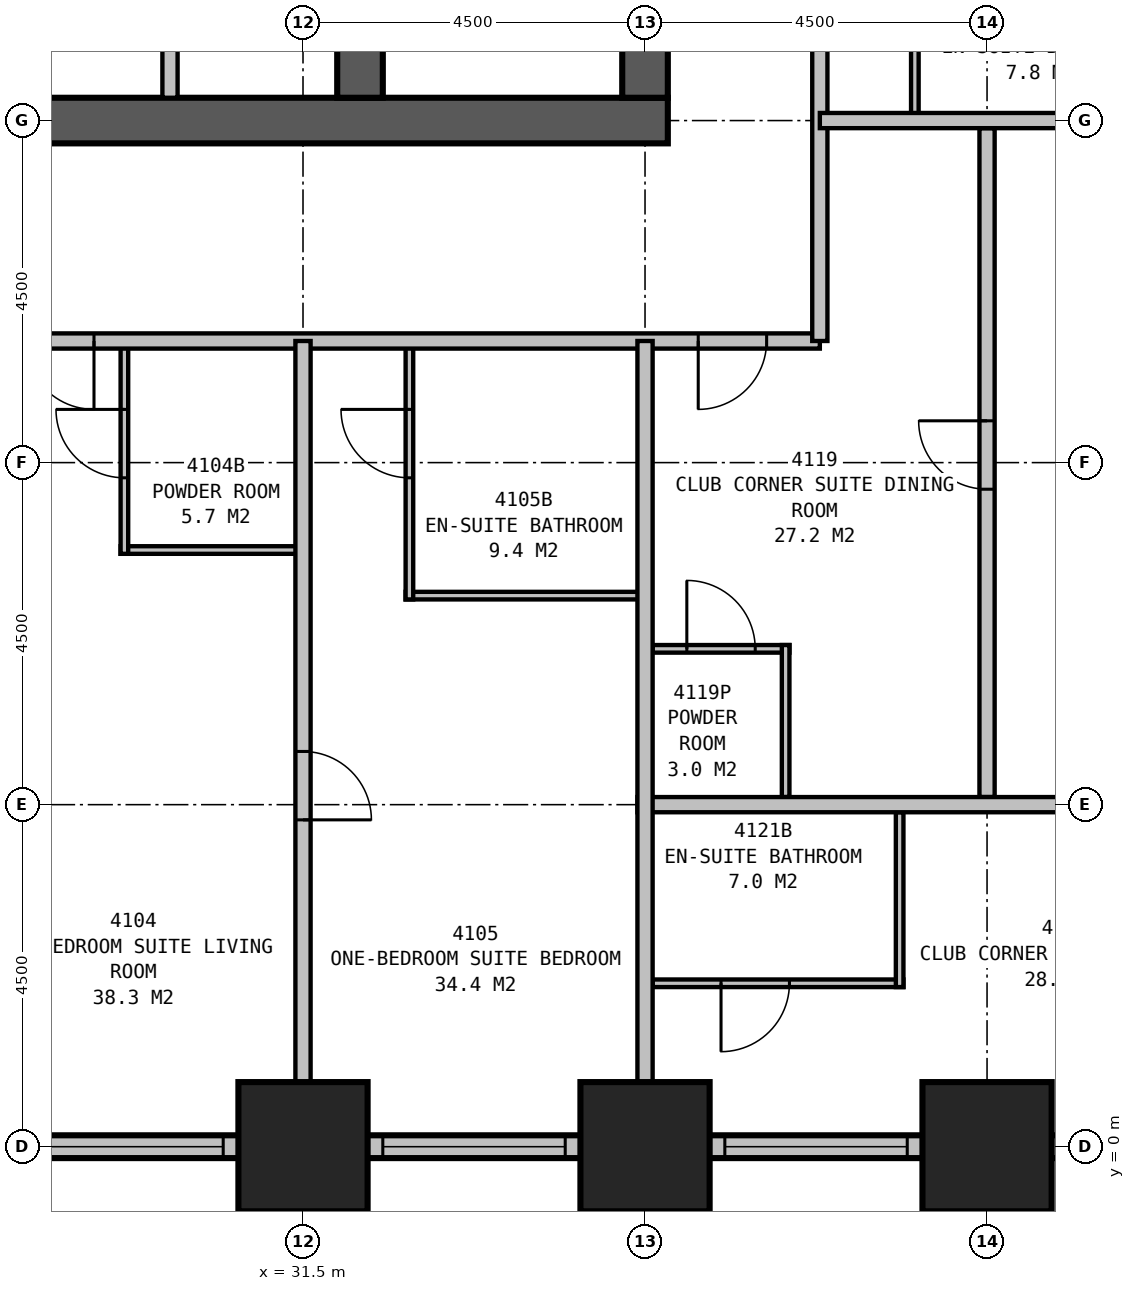
"""IFC4 building model, lengths in metres.
Left out: names, types, materials, properties, quantities, classifications, styles, units other than length and angle.
Written with IfcOpenShell. Run it as: python <this file> out.ifc"""

import sys

from ifc_helpers import new_model, si_unit, direction, frame, frame_2d, origin, origin_2d, place, context, subcontext, project, spatial, rectangle, extrude, element, fill, save


model = new_model("IFC4")
c1 = context("Model", 3, precision=1e-05, world=origin(), true_north=direction((0.0, 1.0)))
c2 = subcontext(c1, "Body", "Model", "MODEL_VIEW")
j1 = project(units=[si_unit("LENGTHUNIT", "METRE"), si_unit("PLANEANGLEUNIT", "RADIAN")], contexts=[c1])
p1 = place(None, origin())
s1 = spatial("IfcSite", under=j1, at=p1, CompositionType="ELEMENT")
p2 = place(p1, origin())
s2 = spatial("IfcBuilding", under=s1, at=p2, CompositionType="ELEMENT")
p3 = place(p2, frame((0.0, 0.0, 162.4)))
s3 = spatial("IfcBuildingStorey", under=s2, at=p3, CompositionType="ELEMENT", Elevation=162.4)
for number, where, z_axis, x_axis in (
    (1, (31.5, 0.0, 0.0), (0.0, 0.0, 1.0), (1.0, 0.0, 0.0)),
    (2, (36.0, 0.0, 0.0), (0.0, 0.0, 1.0), (1.0, 0.0, 0.0)),
    (3, (40.5, 0.0, 0.0), (0.0, 0.0, 1.0), (1.0, 0.0, 0.0)),
):
    element("IfcColumn", number, at=place(p3, frame(where, z_axis=z_axis, x_axis=x_axis)), inside=s3, PredefinedType="COLUMN", context=c2, shape_type="SweptSolid", body=[
        extrude(rectangle(XDim=1.7, YDim=1.7, at=origin_2d()), origin(), (0.0, 0.0, 1.0), 3.5),
    ])
p4 = place(p3, frame((13.2, 13.5, 0.0), z_axis=(0.0, 0.0, 1.0), x_axis=(1.0, 0.0, 0.0)))
e4 = element("IfcWall", 4, at=p4, inside=s3, PredefinedType="SHEAR", context=c2, shape_type="SweptSolid", body=[
    extrude(rectangle(XDim=23.1, YDim=0.6, at=frame_2d((11.55, 0.0))), origin(), (0.0, 0.0, 1.0), 3.5),
])
p5 = place(p3, frame((32.25, 13.8, 0.0), z_axis=(0.0, 0.0, 1.0), x_axis=(0.0, 1.0, 0.0)))
e5 = element("IfcWall", 5, at=p5, inside=s3, PredefinedType="SHEAR", context=c2, shape_type="SweptSolid", body=[
    extrude(rectangle(XDim=12.9, YDim=0.6, at=frame_2d((6.45, 0.0))), origin(), (0.0, 0.0, 1.0), 3.5),
])
p6 = place(p5, frame((5.05, 0.0, 0.0), z_axis=(0.0, 0.0, 1.0), x_axis=(-1.0, 0.0, 0.0)))
e6 = element("IfcOpeningElement", 6, at=p6, cuts=e5, PredefinedType="OPENING", context=c2, shape_type="SweptSolid", body=[
    extrude(rectangle(XDim=1.2, YDim=2.1, at=frame_2d((0.6, 1.05))), frame((0.0, 0.31, 0.0), z_axis=(0.0, -1.0, 0.0), x_axis=(1.0, 0.0, 0.0)), (0.0, 0.0, 1.0), 0.62),
])
p7 = place(p3, frame((36.0, 13.8, 0.0), z_axis=(0.0, 0.0, 1.0), x_axis=(0.0, 1.0, 0.0)))
e7 = element("IfcWall", 7, at=p7, inside=s3, PredefinedType="SHEAR", context=c2, shape_type="SweptSolid", body=[
    extrude(rectangle(XDim=2.7, YDim=0.6, at=frame_2d((1.35, 0.0))), origin(), (0.0, 0.0, 1.0), 3.5),
])
p8 = place(p3, frame((8.85, 0.0, 0.0), z_axis=(0.0, 0.0, 1.0), x_axis=(1.0, 0.0, 0.0)))
e8 = element("IfcWall", 8, at=p8, inside=s3, PredefinedType="STANDARD", context=c2, shape_type="SweptSolid", body=[
    extrude(rectangle(XDim=36.3, YDim=0.3, at=frame_2d((18.15, 0.0))), origin(), (0.0, 0.0, 1.0), 2.25),
])
p9 = place(p8, frame((1.65, 0.0, 0.5)))
e9 = element("IfcOpeningElement", 9, at=p9, cuts=e8, PredefinedType="OPENING", context=c2, shape_type="SweptSolid", body=[
    extrude(rectangle(XDim=1.5, YDim=1.6, at=frame_2d((0.75, 0.8))), frame((0.0, 0.16, 0.0), z_axis=(0.0, -1.0, 0.0), x_axis=(1.0, 0.0, 0.0)), (0.0, 0.0, 1.0), 0.32),
])
p10 = place(p8, frame((5.7, 0.0, 0.5)))
e10 = element("IfcOpeningElement", 10, at=p10, cuts=e8, PredefinedType="OPENING", context=c2, shape_type="SweptSolid", body=[
    extrude(rectangle(XDim=2.4, YDim=1.6, at=frame_2d((1.2, 0.8))), frame((0.0, 0.16, 0.0), z_axis=(0.0, -1.0, 0.0), x_axis=(1.0, 0.0, 0.0)), (0.0, 0.0, 1.0), 0.32),
])
p11 = place(p8, frame((10.2, 0.0, 0.5)))
e11 = element("IfcOpeningElement", 11, at=p11, cuts=e8, PredefinedType="OPENING", context=c2, shape_type="SweptSolid", body=[
    extrude(rectangle(XDim=2.4, YDim=1.6, at=frame_2d((1.2, 0.8))), frame((0.0, 0.16, 0.0), z_axis=(0.0, -1.0, 0.0), x_axis=(1.0, 0.0, 0.0)), (0.0, 0.0, 1.0), 0.32),
])
p12 = place(p8, frame((14.7, 0.0, 0.5)))
e12 = element("IfcOpeningElement", 12, at=p12, cuts=e8, PredefinedType="OPENING", context=c2, shape_type="SweptSolid", body=[
    extrude(rectangle(XDim=2.4, YDim=1.6, at=frame_2d((1.2, 0.8))), frame((0.0, 0.16, 0.0), z_axis=(0.0, -1.0, 0.0), x_axis=(1.0, 0.0, 0.0)), (0.0, 0.0, 1.0), 0.32),
])
p13 = place(p8, frame((19.2, 0.0, 0.5)))
e13 = element("IfcOpeningElement", 13, at=p13, cuts=e8, PredefinedType="OPENING", context=c2, shape_type="SweptSolid", body=[
    extrude(rectangle(XDim=2.4, YDim=1.6, at=frame_2d((1.2, 0.8))), frame((0.0, 0.16, 0.0), z_axis=(0.0, -1.0, 0.0), x_axis=(1.0, 0.0, 0.0)), (0.0, 0.0, 1.0), 0.32),
])
p14 = place(p8, frame((23.7, 0.0, 0.5)))
e14 = element("IfcOpeningElement", 14, at=p14, cuts=e8, PredefinedType="OPENING", context=c2, shape_type="SweptSolid", body=[
    extrude(rectangle(XDim=2.4, YDim=1.6, at=frame_2d((1.2, 0.8))), frame((0.0, 0.16, 0.0), z_axis=(0.0, -1.0, 0.0), x_axis=(1.0, 0.0, 0.0)), (0.0, 0.0, 1.0), 0.32),
])
p15 = place(p8, frame((28.2, 0.0, 0.5)))
e15 = element("IfcOpeningElement", 15, at=p15, cuts=e8, PredefinedType="OPENING", context=c2, shape_type="SweptSolid", body=[
    extrude(rectangle(XDim=2.4, YDim=1.6, at=frame_2d((1.2, 0.8))), frame((0.0, 0.16, 0.0), z_axis=(0.0, -1.0, 0.0), x_axis=(1.0, 0.0, 0.0)), (0.0, 0.0, 1.0), 0.32),
])
p16 = place(p8, frame((32.7, 0.0, 0.5)))
e16 = element("IfcOpeningElement", 16, at=p16, cuts=e8, PredefinedType="OPENING", context=c2, shape_type="SweptSolid", body=[
    extrude(rectangle(XDim=2.4, YDim=1.6, at=frame_2d((1.2, 0.8))), frame((0.0, 0.16, 0.0), z_axis=(0.0, -1.0, 0.0), x_axis=(1.0, 0.0, 0.0)), (0.0, 0.0, 1.0), 0.32),
])
p17 = place(p3, frame((11.2, 10.6, 0.0), z_axis=(0.0, 0.0, 1.0), x_axis=(1.0, 0.0, 0.0)))
e17 = element("IfcWall", 17, at=p17, inside=s3, PredefinedType="PARTITIONING", context=c2, shape_type="SweptSolid", body=[
    extrude(rectangle(XDim=27.1, YDim=0.2, at=frame_2d((13.55, 0.0))), origin(), (0.0, 0.0, 1.0), 3.25),
])
p18 = place(p17, frame((4.05, 0.0, 0.0), z_axis=(0.0, 0.0, 1.0), x_axis=(-1.0, 0.0, 0.0)))
e18 = element("IfcOpeningElement", 18, at=p18, cuts=e17, PredefinedType="OPENING", context=c2, shape_type="SweptSolid", body=[
    extrude(rectangle(XDim=0.9, YDim=2.1, at=frame_2d((0.45, 1.05))), frame((0.0, 0.11, 0.0), z_axis=(0.0, -1.0, 0.0), x_axis=(1.0, 0.0, 0.0)), (0.0, 0.0, 1.0), 0.22),
])
p19 = place(p17, frame((12.65, 0.0, 0.0), z_axis=(0.0, 0.0, 1.0), x_axis=(-1.0, 0.0, 0.0)))
e19 = element("IfcOpeningElement", 19, at=p19, cuts=e17, PredefinedType="OPENING", context=c2, shape_type="SweptSolid", body=[
    extrude(rectangle(XDim=1.0, YDim=2.1, at=frame_2d((0.5, 1.05))), frame((0.0, 0.11, 0.0), z_axis=(0.0, -1.0, 0.0), x_axis=(1.0, 0.0, 0.0)), (0.0, 0.0, 1.0), 0.22),
])
p20 = place(p17, frame((17.55, 0.0, 0.0), z_axis=(0.0, 0.0, 1.0), x_axis=(-1.0, 0.0, 0.0)))
e20 = element("IfcOpeningElement", 20, at=p20, cuts=e17, PredefinedType="OPENING", context=c2, shape_type="SweptSolid", body=[
    extrude(rectangle(XDim=0.9, YDim=2.1, at=frame_2d((0.45, 1.05))), frame((0.0, 0.11, 0.0), z_axis=(0.0, -1.0, 0.0), x_axis=(1.0, 0.0, 0.0)), (0.0, 0.0, 1.0), 0.22),
])
p21 = place(p17, frame((1.6, 0.0, 0.0), z_axis=(0.0, 0.0, 1.0), x_axis=(-1.0, 0.0, 0.0)))
e21 = element("IfcOpeningElement", 21, at=p21, cuts=e17, PredefinedType="OPENING", context=c2, shape_type="SweptSolid", body=[
    extrude(rectangle(XDim=0.9, YDim=2.1, at=frame_2d((0.45, 1.05))), frame((0.0, 0.11, 0.0), z_axis=(0.0, -1.0, 0.0), x_axis=(1.0, 0.0, 0.0)), (0.0, 0.0, 1.0), 0.22),
])
p22 = place(p17, frame((26.4, 0.0, 0.0), z_axis=(0.0, 0.0, 1.0), x_axis=(-1.0, 0.0, 0.0)))
e22 = element("IfcOpeningElement", 22, at=p22, cuts=e17, PredefinedType="OPENING", context=c2, shape_type="SweptSolid", body=[
    extrude(rectangle(XDim=0.9, YDim=2.1, at=frame_2d((0.45, 1.05))), frame((0.0, 0.11, 0.0), z_axis=(0.0, -1.0, 0.0), x_axis=(1.0, 0.0, 0.0)), (0.0, 0.0, 1.0), 0.22),
])
p23 = place(p3, frame((38.3, 10.6, 0.0), z_axis=(0.0, 0.0, 1.0), x_axis=(0.0, 1.0, 0.0)))
e23 = element("IfcWall", 23, at=p23, inside=s3, PredefinedType="PARTITIONING", context=c2, shape_type="SweptSolid", body=[
    extrude(rectangle(XDim=18.7, YDim=0.2, at=frame_2d((9.35, 0.0))), origin(), (0.0, 0.0, 1.0), 3.25),
])
p24 = place(p23, frame((6.95, 0.0, 0.0), z_axis=(0.0, 0.0, 1.0), x_axis=(-1.0, 0.0, 0.0)))
e24 = element("IfcOpeningElement", 24, at=p24, cuts=e23, PredefinedType="OPENING", context=c2, shape_type="SweptSolid", body=[
    extrude(rectangle(XDim=0.9, YDim=2.1, at=frame_2d((0.45, 1.05))), frame((0.0, 0.11, 0.0), z_axis=(0.0, -1.0, 0.0), x_axis=(1.0, 0.0, 0.0)), (0.0, 0.0, 1.0), 0.22),
])
p25 = place(p23, frame((11.05, 0.0, 0.0), z_axis=(0.0, 0.0, 1.0), x_axis=(-1.0, 0.0, 0.0)))
e25 = element("IfcOpeningElement", 25, at=p25, cuts=e23, PredefinedType="OPENING", context=c2, shape_type="SweptSolid", body=[
    extrude(rectangle(XDim=0.9, YDim=2.1, at=frame_2d((0.45, 1.05))), frame((0.0, 0.11, 0.0), z_axis=(0.0, -1.0, 0.0), x_axis=(1.0, 0.0, 0.0)), (0.0, 0.0, 1.0), 0.22),
])
p26 = place(p3, frame((31.5, 10.6, 0.0), z_axis=(0.0, 0.0, 1.0), x_axis=(0.0, -1.0, 0.0)))
e26 = element("IfcWall", 26, at=p26, inside=s3, PredefinedType="PARTITIONING", context=c2, shape_type="SweptSolid", body=[
    extrude(rectangle(XDim=10.6, YDim=0.2, at=frame_2d((5.3, 0.0))), origin(), (0.0, 0.0, 1.0), 2.25),
])
p27 = place(p26, frame((5.4, 0.0, 0.0)))
e27 = element("IfcOpeningElement", 27, at=p27, cuts=e26, PredefinedType="OPENING", context=c2, shape_type="SweptSolid", body=[
    extrude(rectangle(XDim=0.9, YDim=2.1, at=frame_2d((0.45, 1.05))), frame((0.0, 0.11, 0.0), z_axis=(0.0, -1.0, 0.0), x_axis=(1.0, 0.0, 0.0)), (0.0, 0.0, 1.0), 0.22),
])
p28 = place(p3, frame((29.1, 7.85, 0.0), z_axis=(0.0, 0.0, 1.0), x_axis=(1.0, 0.0, 0.0)))
e28 = element("IfcWall", 28, at=p28, inside=s3, PredefinedType="PLUMBINGWALL", context=c2, shape_type="SweptSolid", body=[
    extrude(rectangle(XDim=2.4, YDim=0.1, at=frame_2d((1.2, 0.0))), origin(), (0.0, 0.0, 1.0), 3.25),
])
p29 = place(p3, frame((29.15, 10.6, 0.0), z_axis=(0.0, 0.0, 1.0), x_axis=(0.0, -1.0, 0.0)))
e29 = element("IfcWall", 29, at=p29, inside=s3, PredefinedType="PLUMBINGWALL", context=c2, shape_type="SweptSolid", body=[
    extrude(rectangle(XDim=2.8, YDim=0.1, at=frame_2d((1.4, 0.0))), origin(), (0.0, 0.0, 1.0), 3.25),
])
p30 = place(p29, frame((1.8, 0.0, 0.0), z_axis=(0.0, 0.0, 1.0), x_axis=(-1.0, 0.0, 0.0)))
e30 = element("IfcOpeningElement", 30, at=p30, cuts=e29, PredefinedType="OPENING", context=c2, shape_type="SweptSolid", body=[
    extrude(rectangle(XDim=0.9, YDim=2.1, at=frame_2d((0.45, 1.05))), frame((0.0, 0.06, 0.0), z_axis=(0.0, -1.0, 0.0), x_axis=(1.0, 0.0, 0.0)), (0.0, 0.0, 1.0), 0.12),
])
p31 = place(p3, frame((32.85, 7.25, 0.0), z_axis=(0.0, 0.0, 1.0), x_axis=(1.0, 0.0, 0.0)))
e31 = element("IfcWall", 31, at=p31, inside=s3, PredefinedType="PLUMBINGWALL", context=c2, shape_type="SweptSolid", body=[
    extrude(rectangle(XDim=3.15, YDim=0.1, at=frame_2d((1.575, 0.0))), origin(), (0.0, 0.0, 1.0), 3.25),
])
p32 = place(p3, frame((32.9, 10.6, 0.0), z_axis=(0.0, 0.0, 1.0), x_axis=(0.0, -1.0, 0.0)))
e32 = element("IfcWall", 32, at=p32, inside=s3, PredefinedType="PLUMBINGWALL", context=c2, shape_type="SweptSolid", body=[
    extrude(rectangle(XDim=3.4, YDim=0.1, at=frame_2d((1.7, 0.0))), origin(), (0.0, 0.0, 1.0), 3.25),
])
p33 = place(p32, frame((1.8, 0.0, 0.0), z_axis=(0.0, 0.0, 1.0), x_axis=(-1.0, 0.0, 0.0)))
e33 = element("IfcOpeningElement", 33, at=p33, cuts=e32, PredefinedType="OPENING", context=c2, shape_type="SweptSolid", body=[
    extrude(rectangle(XDim=0.9, YDim=2.1, at=frame_2d((0.45, 1.05))), frame((0.0, 0.06, 0.0), z_axis=(0.0, -1.0, 0.0), x_axis=(1.0, 0.0, 0.0)), (0.0, 0.0, 1.0), 0.12),
])
p34 = place(p3, frame((39.55, 13.5, 0.0), z_axis=(0.0, 0.0, 1.0), x_axis=(0.0, 1.0, 0.0)))
e34 = element("IfcWall", 34, at=p34, inside=s3, PredefinedType="PLUMBINGWALL", context=c2, shape_type="SweptSolid", body=[
    extrude(rectangle(XDim=2.8, YDim=0.1, at=frame_2d((1.4, 0.0))), origin(), (0.0, 0.0, 1.0), 3.25),
])
p35 = place(p3, frame((38.3, 13.5, 0.0), z_axis=(0.0, 0.0, 1.0), x_axis=(1.0, 0.0, 0.0)))
e35 = element("IfcWall", 35, at=p35, inside=s3, PredefinedType="PARTITIONING", context=c2, shape_type="SweptSolid", body=[
    extrude(rectangle(XDim=9.921, YDim=0.2, at=frame_2d((4.96, 0.0))), origin(), (0.0, 0.0, 1.0), 1.95),
])
p36 = place(p3, frame((36.0, 10.6, 0.0), z_axis=(0.0, 0.0, 1.0), x_axis=(0.0, -1.0, 0.0)))
e36 = element("IfcWall", 36, at=p36, inside=s3, PredefinedType="PARTITIONING", context=c2, shape_type="SweptSolid", body=[
    extrude(rectangle(XDim=10.6, YDim=0.2, at=frame_2d((5.3, 0.0))), origin(), (0.0, 0.0, 1.0), 2.25),
])
p37 = place(p3, frame((35.9, 4.5, 0.0), z_axis=(0.0, 0.0, 1.0), x_axis=(1.0, 0.0, 0.0)))
e37 = element("IfcWall", 37, at=p37, inside=s3, PredefinedType="PARTITIONING", context=c2, shape_type="SweptSolid", body=[
    extrude(rectangle(XDim=9.1, YDim=0.2, at=frame_2d((4.55, 0.0))), origin(), (0.0, 0.0, 1.0), 3.25),
])
p38 = place(p37, frame((7.1, 0.0, 0.0)))
e38 = element("IfcOpeningElement", 38, at=p38, cuts=e37, PredefinedType="OPENING", context=c2, shape_type="SweptSolid", body=[
    extrude(rectangle(XDim=0.9, YDim=2.1, at=frame_2d((0.45, 1.05))), frame((0.0, 0.11, 0.0), z_axis=(0.0, -1.0, 0.0), x_axis=(1.0, 0.0, 0.0)), (0.0, 0.0, 1.0), 0.22),
])
p39 = place(p3, frame((40.5, 4.6, 0.0), z_axis=(0.0, 0.0, 1.0), x_axis=(0.0, 1.0, 0.0)))
e39 = element("IfcWall", 39, at=p39, inside=s3, PredefinedType="PARTITIONING", context=c2, shape_type="SweptSolid", body=[
    extrude(rectangle(XDim=8.8, YDim=0.2, at=frame_2d((4.4, 0.0))), origin(), (0.0, 0.0, 1.0), 2.25),
])
p40 = place(p39, frame((4.05, 0.0, 0.0)))
e40 = element("IfcOpeningElement", 40, at=p40, cuts=e39, PredefinedType="OPENING", context=c2, shape_type="SweptSolid", body=[
    extrude(rectangle(XDim=0.9, YDim=2.1, at=frame_2d((0.45, 1.05))), frame((0.0, 0.11, 0.0), z_axis=(0.0, -1.0, 0.0), x_axis=(1.0, 0.0, 0.0)), (0.0, 0.0, 1.0), 0.22),
])
p41 = place(p3, frame((37.85, 4.6, 0.0), z_axis=(0.0, 0.0, 1.0), x_axis=(0.0, 1.0, 0.0)))
e41 = element("IfcWall", 41, at=p41, inside=s3, PredefinedType="PLUMBINGWALL", context=c2, shape_type="SweptSolid", body=[
    extrude(rectangle(XDim=2.0, YDim=0.1, at=frame_2d((1.0, 0.0))), origin(), (0.0, 0.0, 1.0), 3.25),
])
p42 = place(p3, frame((36.1, 6.55, 0.0), z_axis=(0.0, 0.0, 1.0), x_axis=(1.0, 0.0, 0.0)))
e42 = element("IfcWall", 42, at=p42, inside=s3, PredefinedType="PLUMBINGWALL", context=c2, shape_type="SweptSolid", body=[
    extrude(rectangle(XDim=1.8, YDim=0.1, at=frame_2d((0.9, 0.0))), origin(), (0.0, 0.0, 1.0), 3.25),
])
p43 = place(p42, frame((0.45, 0.0, 0.0)))
e43 = element("IfcOpeningElement", 43, at=p43, cuts=e42, PredefinedType="OPENING", context=c2, shape_type="SweptSolid", body=[
    extrude(rectangle(XDim=0.9, YDim=2.1, at=frame_2d((0.45, 1.05))), frame((0.0, 0.06, 0.0), z_axis=(0.0, -1.0, 0.0), x_axis=(1.0, 0.0, 0.0)), (0.0, 0.0, 1.0), 0.12),
])
p44 = place(p3, frame((39.35, 4.4, 0.0), z_axis=(0.0, 0.0, 1.0), x_axis=(0.0, -1.0, 0.0)))
e44 = element("IfcWall", 44, at=p44, inside=s3, PredefinedType="PLUMBINGWALL", context=c2, shape_type="SweptSolid", body=[
    extrude(rectangle(XDim=2.3, YDim=0.1, at=frame_2d((1.15, 0.0))), origin(), (0.0, 0.0, 1.0), 3.25),
])
p45 = place(p3, frame((36.1, 2.15, 0.0), z_axis=(0.0, 0.0, 1.0), x_axis=(1.0, 0.0, 0.0)))
e45 = element("IfcWall", 45, at=p45, inside=s3, PredefinedType="PLUMBINGWALL", context=c2, shape_type="SweptSolid", body=[
    extrude(rectangle(XDim=3.3, YDim=0.1, at=frame_2d((1.65, 0.0))), origin(), (0.0, 0.0, 1.0), 3.25),
])
p46 = place(p45, frame((1.8, 0.0, 0.0), z_axis=(0.0, 0.0, 1.0), x_axis=(-1.0, 0.0, 0.0)))
e46 = element("IfcOpeningElement", 46, at=p46, cuts=e45, PredefinedType="OPENING", context=c2, shape_type="SweptSolid", body=[
    extrude(rectangle(XDim=0.9, YDim=2.1, at=frame_2d((0.45, 1.05))), frame((0.0, 0.06, 0.0), z_axis=(0.0, -1.0, 0.0), x_axis=(1.0, 0.0, 0.0)), (0.0, 0.0, 1.0), 0.12),
])
p47 = place(p3, frame((29.75, 13.8, 0.0), z_axis=(0.0, 0.0, 1.0), x_axis=(0.0, 1.0, 0.0)))
e47 = element("IfcWall", 47, at=p47, inside=s3, PredefinedType="PARTITIONING", context=c2, shape_type="SweptSolid", body=[
    extrude(rectangle(XDim=2.4, YDim=0.2, at=frame_2d((1.2, 0.0))), origin(), (0.0, 0.0, 1.0), 3.25),
])
p48 = place(p13, origin())
e48 = element("IfcWindow", 48, at=p48, inside=s3, PartitioningType="SINGLE_PANEL", PredefinedType="WINDOW", context=c2, shape_type="SweptSolid", body=[
    extrude(rectangle(XDim=2.4, YDim=1.6, at=frame_2d((1.2, 0.8))), frame((0.0, 0.03, 0.0), z_axis=(0.0, -1.0, 0.0), x_axis=(1.0, 0.0, 0.0)), (0.0, 0.0, 1.0), 0.06),
])
fill(e13, e48)
p49 = place(p14, origin())
e49 = element("IfcWindow", 49, at=p49, inside=s3, PartitioningType="SINGLE_PANEL", PredefinedType="WINDOW", context=c2, shape_type="SweptSolid", body=[
    extrude(rectangle(XDim=2.4, YDim=1.6, at=frame_2d((1.2, 0.8))), frame((0.0, 0.03, 0.0), z_axis=(0.0, -1.0, 0.0), x_axis=(1.0, 0.0, 0.0)), (0.0, 0.0, 1.0), 0.06),
])
fill(e14, e49)
p50 = place(p15, origin())
e50 = element("IfcWindow", 50, at=p50, inside=s3, PartitioningType="SINGLE_PANEL", PredefinedType="WINDOW", context=c2, shape_type="SweptSolid", body=[
    extrude(rectangle(XDim=2.4, YDim=1.6, at=frame_2d((1.2, 0.8))), frame((0.0, 0.03, 0.0), z_axis=(0.0, -1.0, 0.0), x_axis=(1.0, 0.0, 0.0)), (0.0, 0.0, 1.0), 0.06),
])
fill(e15, e50)
p51 = place(p20, origin())
e51 = element("IfcDoor", 51, at=p51, inside=s3, OperationType="SINGLE_SWING_LEFT", PredefinedType="DOOR", context=c2, shape_type="SweptSolid", body=[
    extrude(rectangle(XDim=0.9, YDim=2.1, at=frame_2d((0.45, 1.05))), frame((0.0, 0.025, 0.0), z_axis=(0.0, -1.0, 0.0), x_axis=(1.0, 0.0, 0.0)), (0.0, 0.0, 1.0), 0.05),
])
fill(e20, e51)
p52 = place(p22, origin())
e52 = element("IfcDoor", 52, at=p52, inside=s3, OperationType="SINGLE_SWING_RIGHT", PredefinedType="DOOR", context=c2, shape_type="SweptSolid", body=[
    extrude(rectangle(XDim=0.9, YDim=2.1, at=frame_2d((0.45, 1.05))), frame((0.0, 0.025, 0.0), z_axis=(0.0, -1.0, 0.0), x_axis=(1.0, 0.0, 0.0)), (0.0, 0.0, 1.0), 0.05),
])
fill(e22, e52)
p53 = place(p27, origin())
e53 = element("IfcDoor", 53, at=p53, inside=s3, OperationType="SINGLE_SWING_RIGHT", PredefinedType="DOOR", context=c2, shape_type="SweptSolid", body=[
    extrude(rectangle(XDim=0.9, YDim=2.1, at=frame_2d((0.45, 1.05))), frame((0.0, 0.025, 0.0), z_axis=(0.0, -1.0, 0.0), x_axis=(1.0, 0.0, 0.0)), (0.0, 0.0, 1.0), 0.05),
])
fill(e27, e53)
p54 = place(p30, origin())
e54 = element("IfcDoor", 54, at=p54, inside=s3, OperationType="SINGLE_SWING_RIGHT", PredefinedType="DOOR", context=c2, shape_type="SweptSolid", body=[
    extrude(rectangle(XDim=0.9, YDim=2.1, at=frame_2d((0.45, 1.05))), frame((0.0, 0.025, 0.0), z_axis=(0.0, -1.0, 0.0), x_axis=(1.0, 0.0, 0.0)), (0.0, 0.0, 1.0), 0.05),
])
fill(e30, e54)
p55 = place(p33, origin())
e55 = element("IfcDoor", 55, at=p55, inside=s3, OperationType="SINGLE_SWING_RIGHT", PredefinedType="DOOR", context=c2, shape_type="SweptSolid", body=[
    extrude(rectangle(XDim=0.9, YDim=2.1, at=frame_2d((0.45, 1.05))), frame((0.0, 0.025, 0.0), z_axis=(0.0, -1.0, 0.0), x_axis=(1.0, 0.0, 0.0)), (0.0, 0.0, 1.0), 0.05),
])
fill(e33, e55)
p56 = place(p40, origin())
e56 = element("IfcDoor", 56, at=p56, inside=s3, OperationType="SINGLE_SWING_RIGHT", PredefinedType="DOOR", context=c2, shape_type="SweptSolid", body=[
    extrude(rectangle(XDim=0.9, YDim=2.1, at=frame_2d((0.45, 1.05))), frame((0.0, 0.025, 0.0), z_axis=(0.0, -1.0, 0.0), x_axis=(1.0, 0.0, 0.0)), (0.0, 0.0, 1.0), 0.05),
])
fill(e40, e56)
p57 = place(p43, origin())
e57 = element("IfcDoor", 57, at=p57, inside=s3, OperationType="SINGLE_SWING_LEFT", PredefinedType="DOOR", context=c2, shape_type="SweptSolid", body=[
    extrude(rectangle(XDim=0.9, YDim=2.1, at=frame_2d((0.45, 1.05))), frame((0.0, 0.025, 0.0), z_axis=(0.0, -1.0, 0.0), x_axis=(1.0, 0.0, 0.0)), (0.0, 0.0, 1.0), 0.05),
])
fill(e43, e57)
p58 = place(p46, origin())
e58 = element("IfcDoor", 58, at=p58, inside=s3, OperationType="SINGLE_SWING_RIGHT", PredefinedType="DOOR", context=c2, shape_type="SweptSolid", body=[
    extrude(rectangle(XDim=0.9, YDim=2.1, at=frame_2d((0.45, 1.05))), frame((0.0, 0.025, 0.0), z_axis=(0.0, -1.0, 0.0), x_axis=(1.0, 0.0, 0.0)), (0.0, 0.0, 1.0), 0.05),
])
fill(e46, e58)
save(model, sys.argv[1])
